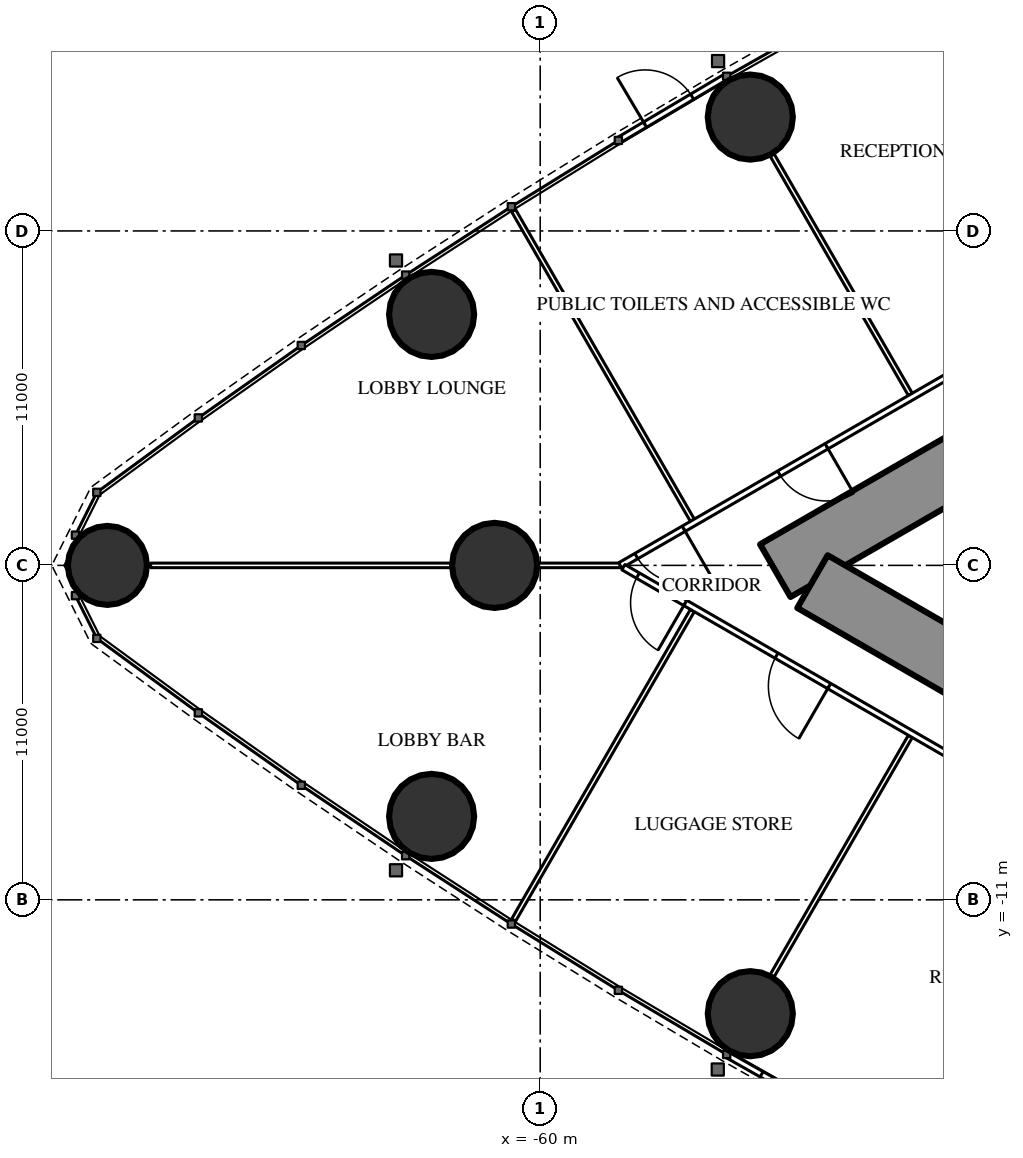
"""IFC4 building model, lengths in metres.
Left out: names, types, materials, properties, quantities, classifications, styles, units other than length and angle.
Written with IfcOpenShell. Run it as: python <this file> out.ifc"""

import sys

from ifc_helpers import new_model, si_unit, direction, frame, frame_2d, origin, origin_2d, place, context, subcontext, project, spatial, rectangle, hollow_circle, extrude, element, fill, save


model = new_model("IFC4")
c1 = context("Model", 3, precision=1e-05, world=origin(), true_north=direction((0.0, 1.0)))
c2 = subcontext(c1, "Body", "Model", "MODEL_VIEW")
j1 = project(units=[si_unit("LENGTHUNIT", "METRE"), si_unit("PLANEANGLEUNIT", "RADIAN")], contexts=[c1])
p1 = place(None, origin())
s1 = spatial("IfcSite", under=j1, at=p1, CompositionType="ELEMENT")
p2 = place(p1, origin())
s2 = spatial("IfcBuilding", under=s1, at=p2, CompositionType="ELEMENT")
p3 = place(p2, origin())
s3 = spatial("IfcBuildingStorey", under=s2, at=p3, CompositionType="ELEMENT", Elevation=0.0)
p4 = place(p3, frame((-74.235, 0.0, 0.0), z_axis=(0.0, 0.0, 1.0), x_axis=(1.0, 0.0, 0.0)))
e1 = element("IfcColumn", 1, at=p4, inside=s3, PredefinedType="COLUMN", context=c2, shape_type="SweptSolid", body=[
    extrude(hollow_circle(Radius=1.3, WallThickness=0.1, at=origin_2d()), origin(), (0.0, 0.0, 1.0), 7.2),
])
for number, where, z_axis, x_axis in (
    (2, (-63.572, -8.255, 0.0), (0.0, 0.0, 1.0), (1.0, 0.0, 0.0)),
    (3, (-53.09, -14.745, 0.0), (0.0, 0.0, 1.0), (1.0, 0.0, 0.0)),
    (4, (-53.09, 14.745, 0.0), (0.0, 0.0, 1.0), (1.0, 0.0, 0.0)),
    (5, (-63.572, 8.255, 0.0), (0.0, 0.0, 1.0), (1.0, 0.0, 0.0)),
):
    element("IfcColumn", number, at=place(p3, frame(where, z_axis=z_axis, x_axis=x_axis)), inside=s3, PredefinedType="COLUMN", context=c2, shape_type="SweptSolid", body=[
        extrude(hollow_circle(Radius=1.4, WallThickness=0.12, at=origin_2d()), origin(), (0.0, 0.0, 1.0), 7.2),
    ])
p5 = place(p3, frame((-61.5, 0.0, 0.0), z_axis=(0.0, 0.0, 1.0), x_axis=(1.0, 0.0, 0.0)))
e6 = element("IfcColumn", 6, at=p5, inside=s3, PredefinedType="COLUMN", context=c2, shape_type="SweptSolid", body=[
    extrude(hollow_circle(Radius=1.4, WallThickness=0.1, at=origin_2d()), origin(), (0.0, 0.0, 1.0), 7.2),
])
p6 = place(p3, frame((-27.2, 14.3, 0.0), z_axis=(0.0, 0.0, 1.0), x_axis=(-0.866026593062, -0.499997940104, 0.0)))
e7 = element("IfcWall", 7, at=p6, inside=s3, PredefinedType="SHEAR", context=c2, shape_type="SweptSolid", body=[
    extrude(rectangle(XDim=28.946, YDim=2.0, at=frame_2d((14.473, 0.0))), origin(), (0.0, 0.0, 1.0), 7.2),
])
p7 = place(p6, frame((4.6, 0.0, 0.0)))
e8 = element("IfcOpeningElement", 8, at=p7, cuts=e7, PredefinedType="OPENING", context=c2, shape_type="SweptSolid", body=[
    extrude(rectangle(XDim=1.0, YDim=2.2, at=frame_2d((0.5, 1.1))), frame((0.0, 1.01, 0.0), z_axis=(0.0, -1.0, 0.0), x_axis=(1.0, 0.0, 0.0)), (0.0, 0.0, 1.0), 2.02),
])
p8 = place(p6, frame((13.395, 0.0, 0.0)))
e9 = element("IfcOpeningElement", 9, at=p8, cuts=e7, PredefinedType="OPENING", context=c2, shape_type="SweptSolid", body=[
    extrude(rectangle(XDim=1.8, YDim=2.2, at=frame_2d((0.9, 1.1))), frame((0.0, 1.01, 0.0), z_axis=(0.0, -1.0, 0.0), x_axis=(1.0, 0.0, 0.0)), (0.0, 0.0, 1.0), 2.02),
])
p9 = place(p3, frame((-27.2, -14.3, 0.0), z_axis=(0.0, 0.0, 1.0), x_axis=(-0.866024044937, 0.500002353585, 0.0)))
e10 = element("IfcWall", 10, at=p9, inside=s3, PredefinedType="SHEAR", context=c2, shape_type="SweptSolid", body=[
    extrude(rectangle(XDim=27.533, YDim=2.0, at=frame_2d((13.767, 0.0))), origin(), (0.0, 0.0, 1.0), 7.2),
])
p10 = place(p9, frame((4.6, 0.0, 0.0)))
e11 = element("IfcOpeningElement", 11, at=p10, cuts=e10, PredefinedType="OPENING", context=c2, shape_type="SweptSolid", body=[
    extrude(rectangle(XDim=1.0, YDim=2.2, at=frame_2d((0.5, 1.1))), frame((0.0, 1.01, 0.0), z_axis=(0.0, -1.0, 0.0), x_axis=(1.0, 0.0, 0.0)), (0.0, 0.0, 1.0), 2.02),
])
p11 = place(p9, frame((13.395, 0.0, 0.0)))
e12 = element("IfcOpeningElement", 12, at=p11, cuts=e10, PredefinedType="OPENING", context=c2, shape_type="SweptSolid", body=[
    extrude(rectangle(XDim=1.8, YDim=2.2, at=frame_2d((0.9, 1.1))), frame((0.0, 1.01, 0.0), z_axis=(0.0, -1.0, 0.0), x_axis=(1.0, 0.0, 0.0)), (0.0, 0.0, 1.0), 2.02),
])
p12 = place(p3, frame((-57.429, 13.976, 0.0), z_axis=(0.0, 0.0, 1.0), x_axis=(0.860382514165, 0.50964882941, 0.0)))
e13 = element("IfcWall", 13, at=p12, inside=s3, PredefinedType="STANDARD", context=c2, shape_type="SweptSolid", body=[
    extrude(rectangle(XDim=4.14, YDim=0.2, at=frame_2d((2.07, 0.0))), origin(), (0.0, 0.0, 1.0), 6.85),
])
p13 = place(p12, frame((1.02, 0.0, 0.0)))
e14 = element("IfcOpeningElement", 14, at=p13, cuts=e13, PredefinedType="OPENING", context=c2, shape_type="SweptSolid", body=[
    extrude(rectangle(XDim=1.8, YDim=2.4, at=frame_2d((0.9, 1.2))), frame((0.0, 0.11, 0.0), z_axis=(0.0, -1.0, 0.0), x_axis=(1.0, 0.0, 0.0)), (0.0, 0.0, 1.0), 0.22),
])
p14 = place(p3, frame((-50.264, -18.126, 0.0), z_axis=(0.0, 0.0, 1.0), x_axis=(-0.870206768985, 0.49268669478, 0.0)))
e15 = element("IfcWall", 15, at=p14, inside=s3, PredefinedType="STANDARD", context=c2, shape_type="SweptSolid", body=[
    extrude(rectangle(XDim=4.14, YDim=0.2, at=frame_2d((2.07, 0.0))), origin(), (0.0, 0.0, 1.0), 6.85),
])
p15 = place(p14, frame((1.02, 0.0, 0.0)))
e16 = element("IfcOpeningElement", 16, at=p15, cuts=e15, PredefinedType="OPENING", context=c2, shape_type="SweptSolid", body=[
    extrude(rectangle(XDim=1.8, YDim=2.4, at=frame_2d((0.9, 1.2))), frame((0.0, 0.11, 0.0), z_axis=(0.0, -1.0, 0.0), x_axis=(1.0, 0.0, 0.0)), (0.0, 0.0, 1.0), 0.22),
])
p16 = place(p3, frame((-47.827, 5.624, 0.0), z_axis=(0.0, 0.0, 1.0), x_axis=(-0.499995404498, 0.866028056982, 0.0)))
e17 = element("IfcWall", 17, at=p16, inside=s3, PredefinedType="PARTITIONING", context=c2, shape_type="SweptSolid", body=[
    extrude(rectangle(XDim=9.11, YDim=0.15, at=frame_2d((4.555, 0.0))), origin(), (0.0, 0.0, 1.0), 5.85),
])
p17 = place(p3, frame((-54.996, 1.485, 0.0), z_axis=(0.0, 0.0, 1.0), x_axis=(-0.500002871521, 0.866023745905, 0.0)))
e18 = element("IfcWall", 18, at=p17, inside=s3, PredefinedType="PARTITIONING", context=c2, shape_type="SweptSolid", body=[
    extrude(rectangle(XDim=11.757, YDim=0.15, at=frame_2d((5.878, 0.0))), origin(), (0.0, 0.0, 1.0), 6.85),
])
p18 = place(p3, frame((-47.827, -5.624, 0.0), z_axis=(0.0, 0.0, 1.0), x_axis=(-0.499995404498, -0.866028056982, 0.0)))
e19 = element("IfcWall", 19, at=p18, inside=s3, PredefinedType="PARTITIONING", context=c2, shape_type="SweptSolid", body=[
    extrude(rectangle(XDim=9.11, YDim=0.15, at=frame_2d((4.555, 0.0))), origin(), (0.0, 0.0, 1.0), 5.85),
])
p19 = place(p3, frame((-54.996, -1.485, 0.0), z_axis=(0.0, 0.0, 1.0), x_axis=(-0.500002871521, -0.866023745905, 0.0)))
e20 = element("IfcWall", 20, at=p19, inside=s3, PredefinedType="PARTITIONING", context=c2, shape_type="SweptSolid", body=[
    extrude(rectangle(XDim=11.757, YDim=0.15, at=frame_2d((5.878, 0.0))), origin(), (0.0, 0.0, 1.0), 6.85),
])
p20 = place(p3, frame((-57.368, 0.0, 0.0), z_axis=(0.0, 0.0, 1.0), x_axis=(-1.0, 0.0, 0.0)))
e21 = element("IfcWall", 21, at=p20, inside=s3, PredefinedType="PARTITIONING", context=c2, shape_type="SweptSolid", body=[
    extrude(rectangle(XDim=15.447, YDim=0.15, at=frame_2d((7.724, 0.0))), origin(), (0.0, 0.0, 1.0), 5.85),
])
p21 = place(p3, frame((-37.9, 11.24, 0.0), z_axis=(0.0, 0.0, 1.0), x_axis=(-0.866022995118, -0.50000417191, 0.0)))
e22 = element("IfcWall", 22, at=p21, inside=s3, PredefinedType="PARTITIONING", context=c2, shape_type="SweptSolid", body=[
    extrude(rectangle(XDim=22.48, YDim=0.2, at=frame_2d((11.24, 0.0))), origin(), (0.0, 0.0, 1.0), 6.85),
])
p22 = place(p21, frame((14.644, 0.0, 0.0)))
e23 = element("IfcOpeningElement", 23, at=p22, cuts=e22, PredefinedType="OPENING", context=c2, shape_type="SweptSolid", body=[
    extrude(rectangle(XDim=1.8, YDim=2.2, at=frame_2d((0.9, 1.1))), frame((0.0, 0.11, 0.0), z_axis=(0.0, -1.0, 0.0), x_axis=(1.0, 0.0, 0.0)), (0.0, 0.0, 1.0), 0.22),
])
p23 = place(p21, frame((20.069, 0.0, 0.0)))
e24 = element("IfcOpeningElement", 24, at=p23, cuts=e22, PredefinedType="OPENING", context=c2, shape_type="SweptSolid", body=[
    extrude(rectangle(XDim=1.8, YDim=2.2, at=frame_2d((0.9, 1.1))), frame((0.0, 0.11, 0.0), z_axis=(0.0, -1.0, 0.0), x_axis=(1.0, 0.0, 0.0)), (0.0, 0.0, 1.0), 0.22),
])
p24 = place(p21, frame((4.915, 0.0, 0.0)))
e25 = element("IfcOpeningElement", 25, at=p24, cuts=e22, PredefinedType="OPENING", context=c2, shape_type="SweptSolid", body=[
    extrude(rectangle(XDim=1.8, YDim=2.2, at=frame_2d((0.9, 1.1))), frame((0.0, 0.11, 0.0), z_axis=(0.0, -1.0, 0.0), x_axis=(1.0, 0.0, 0.0)), (0.0, 0.0, 1.0), 0.22),
])
p25 = place(p3, frame((-37.12, -11.69, 0.0), z_axis=(0.0, 0.0, 1.0), x_axis=(-0.866028803602, 0.499994111297, 0.0)))
e26 = element("IfcWall", 26, at=p25, inside=s3, PredefinedType="PARTITIONING", context=c2, shape_type="SweptSolid", body=[
    extrude(rectangle(XDim=23.26, YDim=0.2, at=frame_2d((11.63, 0.0))), origin(), (0.0, 0.0, 1.0), 6.85),
])
p26 = place(p25, frame((20.909, 0.0, 0.0)))
e27 = element("IfcOpeningElement", 27, at=p26, cuts=e26, PredefinedType="OPENING", context=c2, shape_type="SweptSolid", body=[
    extrude(rectangle(XDim=1.8, YDim=2.2, at=frame_2d((0.9, 1.1))), frame((0.0, 0.11, 0.0), z_axis=(0.0, -1.0, 0.0), x_axis=(1.0, 0.0, 0.0)), (0.0, 0.0, 1.0), 0.22),
])
p27 = place(p25, frame((15.444, 0.0, 0.0)))
e28 = element("IfcOpeningElement", 28, at=p27, cuts=e26, PredefinedType="OPENING", context=c2, shape_type="SweptSolid", body=[
    extrude(rectangle(XDim=2.0, YDim=2.4, at=frame_2d((1.0, 1.2))), frame((0.0, 0.11, 0.0), z_axis=(0.0, -1.0, 0.0), x_axis=(1.0, 0.0, 0.0)), (0.0, 0.0, 1.0), 0.22),
])
p28 = place(p25, frame((5.365, 0.0, 0.0)))
e29 = element("IfcOpeningElement", 29, at=p28, cuts=e26, PredefinedType="OPENING", context=c2, shape_type="SweptSolid", body=[
    extrude(rectangle(XDim=1.8, YDim=2.2, at=frame_2d((0.9, 1.1))), frame((0.0, 0.11, 0.0), z_axis=(0.0, -1.0, 0.0), x_axis=(1.0, 0.0, 0.0)), (0.0, 0.0, 1.0), 0.22),
])
p29 = place(p13, origin())
e30 = element("IfcDoor", 30, at=p29, inside=s3, OperationType="SINGLE_SWING_LEFT", PredefinedType="DOOR", context=c2, shape_type="SweptSolid", body=[
    extrude(rectangle(XDim=1.8, YDim=2.4, at=frame_2d((0.9, 1.2))), frame((0.0, 0.025, 0.0), z_axis=(0.0, -1.0, 0.0), x_axis=(1.0, 0.0, 0.0)), (0.0, 0.0, 1.0), 0.05),
])
fill(e14, e30)
p30 = place(p15, origin())
e31 = element("IfcDoor", 31, at=p30, inside=s3, OperationType="SINGLE_SWING_LEFT", PredefinedType="DOOR", context=c2, shape_type="SweptSolid", body=[
    extrude(rectangle(XDim=1.8, YDim=2.4, at=frame_2d((0.9, 1.2))), frame((0.0, 0.025, 0.0), z_axis=(0.0, -1.0, 0.0), x_axis=(1.0, 0.0, 0.0)), (0.0, 0.0, 1.0), 0.05),
])
fill(e16, e31)
p31 = place(p22, origin())
e32 = element("IfcDoor", 32, at=p31, inside=s3, OperationType="DOUBLE_DOOR_SINGLE_SWING", PredefinedType="DOOR", context=c2, shape_type="SweptSolid", body=[
    extrude(rectangle(XDim=1.8, YDim=2.2, at=frame_2d((0.9, 1.1))), frame((0.0, 0.025, 0.0), z_axis=(0.0, -1.0, 0.0), x_axis=(1.0, 0.0, 0.0)), (0.0, 0.0, 1.0), 0.05),
])
fill(e23, e32)
p32 = place(p23, origin())
e33 = element("IfcDoor", 33, at=p32, inside=s3, OperationType="DOUBLE_DOOR_SINGLE_SWING", PredefinedType="DOOR", context=c2, shape_type="SweptSolid", body=[
    extrude(rectangle(XDim=1.8, YDim=2.2, at=frame_2d((0.9, 1.1))), frame((0.0, 0.025, 0.0), z_axis=(0.0, -1.0, 0.0), x_axis=(1.0, 0.0, 0.0)), (0.0, 0.0, 1.0), 0.05),
])
fill(e24, e33)
p33 = place(p26, origin())
e34 = element("IfcDoor", 34, at=p33, inside=s3, OperationType="DOUBLE_DOOR_SINGLE_SWING", PredefinedType="DOOR", context=c2, shape_type="SweptSolid", body=[
    extrude(rectangle(XDim=1.8, YDim=2.2, at=frame_2d((0.9, 1.1))), frame((0.0, 0.025, 0.0), z_axis=(0.0, -1.0, 0.0), x_axis=(1.0, 0.0, 0.0)), (0.0, 0.0, 1.0), 0.05),
])
fill(e27, e34)
p34 = place(p27, origin())
e35 = element("IfcDoor", 35, at=p34, inside=s3, OperationType="DOUBLE_DOOR_SINGLE_SWING", PredefinedType="DOOR", context=c2, shape_type="SweptSolid", body=[
    extrude(rectangle(XDim=2.0, YDim=2.4, at=frame_2d((1.0, 1.2))), frame((0.0, 0.025, 0.0), z_axis=(0.0, -1.0, 0.0), x_axis=(1.0, 0.0, 0.0)), (0.0, 0.0, 1.0), 0.05),
])
fill(e28, e35)
save(model, sys.argv[1])
